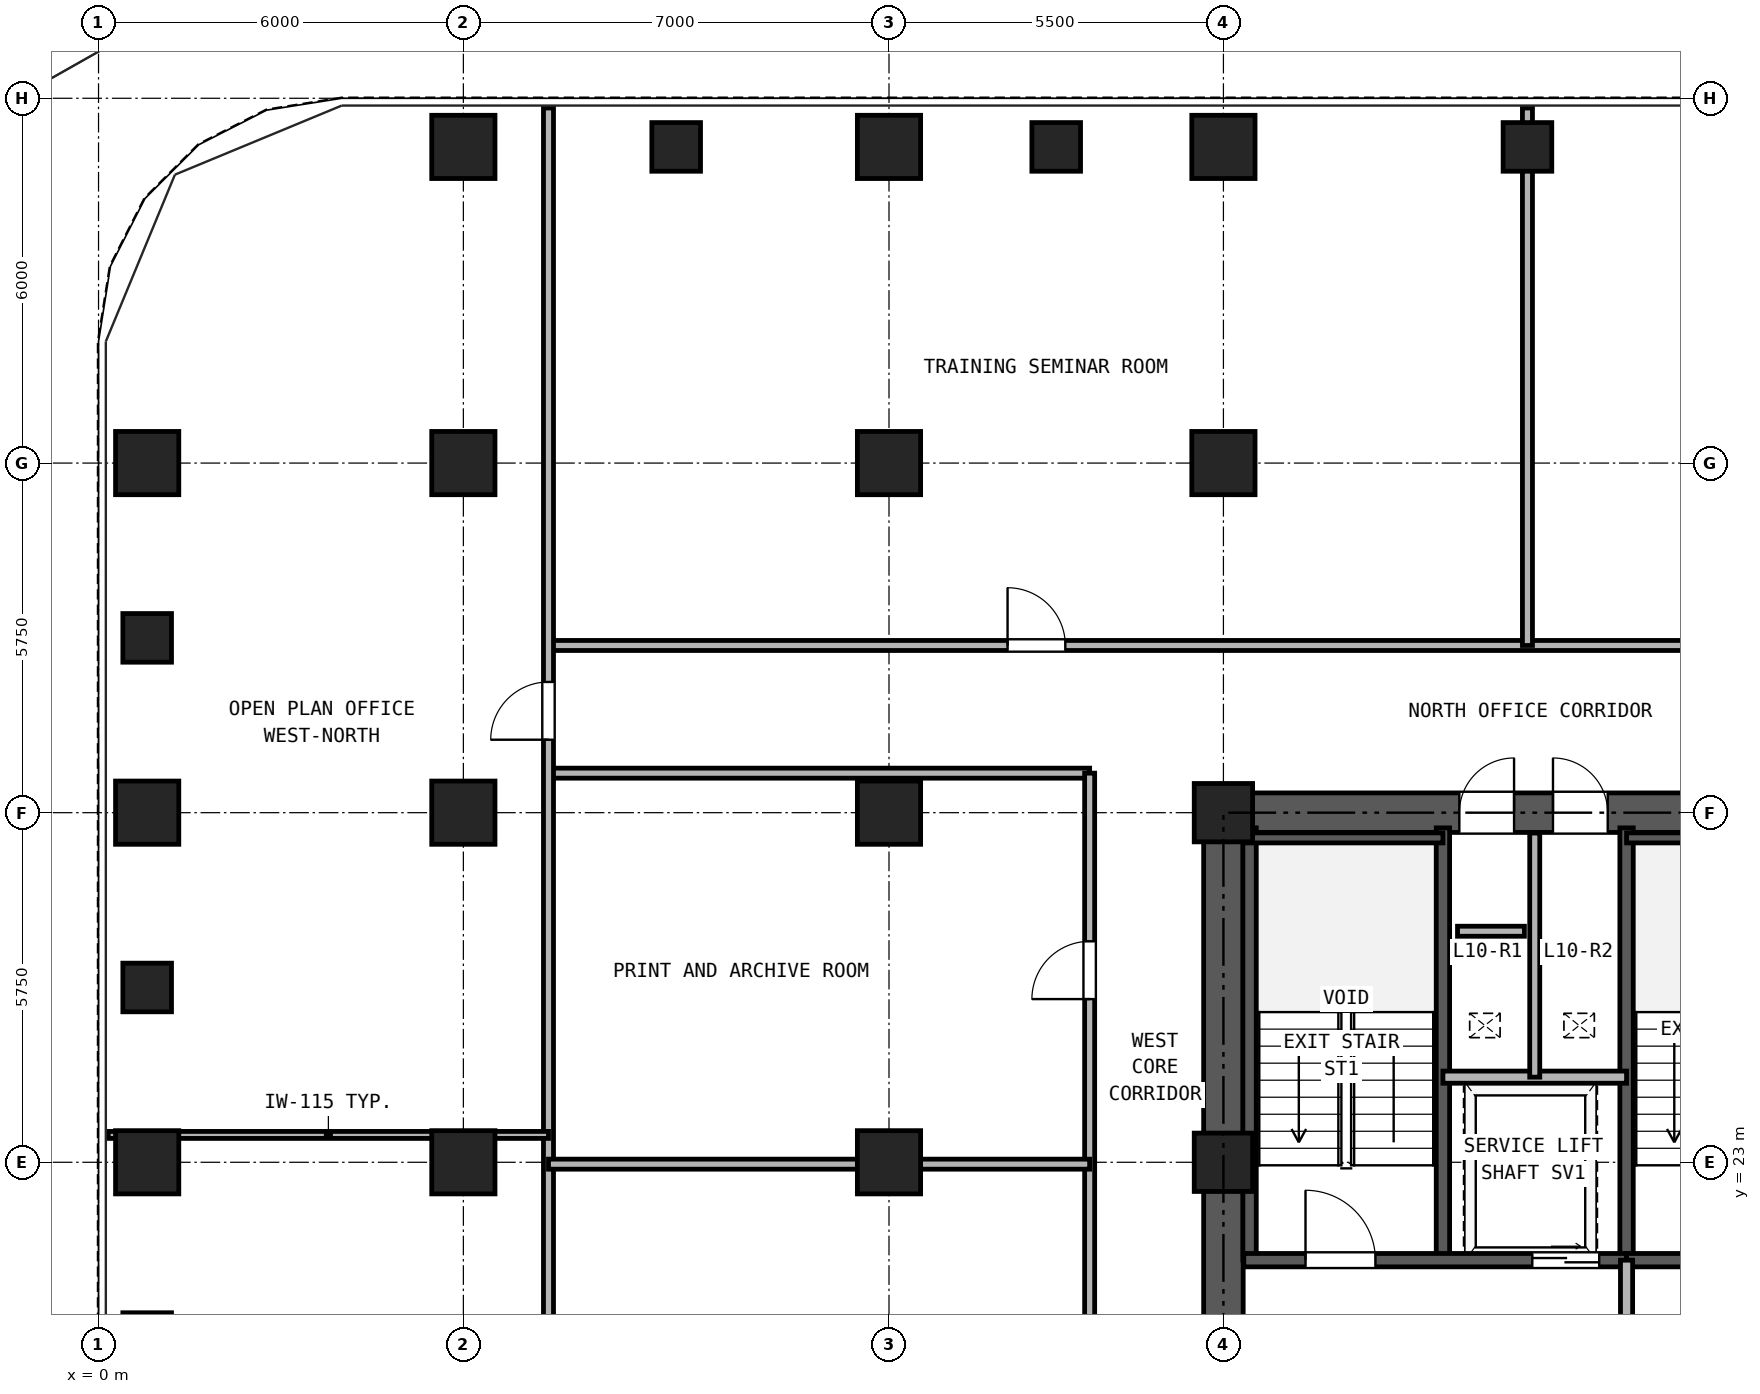
"""IFC4 building model, lengths in metres.
Left out: names, types, materials, properties, quantities, classifications, styles, units other than length and angle.
Written with IfcOpenShell. Run it as: python <this file> out.ifc"""

import sys

from ifc_helpers import new_model, si_unit, direction, frame, frame_2d, origin, origin_2d, place, context, subcontext, project, spatial, rectangle, hollow_rectangle, extrude, source, transform, mapped, element, fill, save


model = new_model("IFC4")
c1 = context("Model", 3, precision=1e-05, world=origin(), true_north=direction((0.0, 1.0)))
c2 = subcontext(c1, "Body", "Model", "MODEL_VIEW")
j1 = project(units=[si_unit("LENGTHUNIT", "METRE"), si_unit("PLANEANGLEUNIT", "RADIAN")], contexts=[c1])
p1 = place(None, origin())
s1 = spatial("IfcSite", under=j1, at=p1, CompositionType="ELEMENT")
p2 = place(p1, origin())
s2 = spatial("IfcBuilding", under=s1, at=p2, CompositionType="ELEMENT")
p3 = place(p2, frame((0.0, 0.0, 40.5)))
s3 = spatial("IfcBuildingStorey", under=s2, at=p3, CompositionType="ELEMENT", Elevation=40.5)
m1 = source(origin(), c2, "Body", "SweptSolid", [
    extrude(hollow_rectangle(XDim=1.04, YDim=1.04, WallThickness=0.065, at=origin_2d()), origin(), (0.0, 0.0, 1.0), 3.32),
])
for number, where, z_axis, x_axis in (
    (1, (6.0, 39.7, 0.0), (0.0, 0.0, 1.0), (1.0, 0.0, 0.0)),
    (2, (13.0, 39.7, 0.0), (0.0, 0.0, 1.0), (1.0, 0.0, 0.0)),
    (3, (18.5, 39.7, 0.0), (0.0, 0.0, 1.0), (1.0, 0.0, 0.0)),
    (4, (0.8, 23.0, 0.0), (0.0, 0.0, 1.0), (1.0, 0.0, 0.0)),
    (5, (0.8, 28.75, 0.0), (0.0, 0.0, 1.0), (1.0, 0.0, 0.0)),
    (6, (0.8, 34.5, 0.0), (0.0, 0.0, 1.0), (1.0, 0.0, 0.0)),
    (7, (6.0, 23.0, 0.0), (0.0, 0.0, 1.0), (1.0, 0.0, 0.0)),
    (8, (6.0, 28.75, 0.0), (0.0, 0.0, 1.0), (1.0, 0.0, 0.0)),
    (9, (6.0, 34.5, 0.0), (0.0, 0.0, 1.0), (1.0, 0.0, 0.0)),
    (10, (13.0, 23.0, 0.0), (0.0, 0.0, 1.0), (1.0, 0.0, 0.0)),
    (11, (13.0, 28.75, 0.0), (0.0, 0.0, 1.0), (1.0, 0.0, 0.0)),
    (12, (13.0, 34.5, 0.0), (0.0, 0.0, 1.0), (1.0, 0.0, 0.0)),
):
    element("IfcColumn", number, at=place(p3, frame(where, z_axis=z_axis, x_axis=x_axis)), inside=s3, PredefinedType="COLUMN", context=c2, shape_type="MappedRepresentation", body=[
        mapped(m1, transform((0.0, 0.0, 0.0), x_axis=(1.0, 0.0, 0.0), y_axis=(0.0, 1.0, 0.0), z_axis=(0.0, 0.0, 1.0), scale=1.0)),
    ])
m2 = source(origin(), c2, "Body", "SweptSolid", [
    extrude(hollow_rectangle(XDim=0.96, YDim=0.96, WallThickness=0.06, at=origin_2d()), origin(), (0.0, 0.0, 1.0), 3.32),
])
for number, where, z_axis, x_axis in (
    (13, (18.5, 23.0, 0.0), (0.0, 0.0, 1.0), (1.0, 0.0, 0.0)),
    (14, (18.5, 28.75, 0.0), (0.0, 0.0, 1.0), (1.0, 0.0, 0.0)),
):
    element("IfcColumn", number, at=place(p3, frame(where, z_axis=z_axis, x_axis=x_axis)), inside=s3, PredefinedType="COLUMN", context=c2, shape_type="MappedRepresentation", body=[
        mapped(m2, transform((0.0, 0.0, 0.0), x_axis=(1.0, 0.0, 0.0), y_axis=(0.0, 1.0, 0.0), z_axis=(0.0, 0.0, 1.0), scale=1.0)),
    ])
p4 = place(p3, frame((18.5, 34.5, 0.0), z_axis=(0.0, 0.0, 1.0), x_axis=(1.0, 0.0, 0.0)))
e15 = element("IfcColumn", 15, at=p4, inside=s3, PredefinedType="COLUMN", context=c2, shape_type="MappedRepresentation", body=[
    mapped(m1, transform((0.0, 0.0, 0.0), x_axis=(1.0, 0.0, 0.0), y_axis=(0.0, 1.0, 0.0), z_axis=(0.0, 0.0, 1.0), scale=1.0)),
])
m3 = source(origin(), c2, "Body", "SweptSolid", [
    extrude(hollow_rectangle(XDim=0.8, YDim=0.8, WallThickness=0.045, at=origin_2d()), origin(), (0.0, 0.0, 1.0), 3.32),
])
for number, where, z_axis, x_axis in (
    (16, (9.5, 39.7, 0.0), (0.0, 0.0, 1.0), (1.0, 0.0, 0.0)),
    (17, (15.75, 39.7, 0.0), (0.0, 0.0, 1.0), (1.0, 0.0, 0.0)),
    (18, (23.5, 39.7, 0.0), (0.0, 0.0, 1.0), (1.0, 0.0, 0.0)),
    (19, (0.8, 20.125, 0.0), (0.0, 0.0, 1.0), (1.0, 0.0, 0.0)),
    (20, (0.8, 25.875, 0.0), (0.0, 0.0, 1.0), (1.0, 0.0, 0.0)),
    (21, (0.8, 31.625, 0.0), (0.0, 0.0, 1.0), (1.0, 0.0, 0.0)),
):
    element("IfcColumn", number, at=place(p3, frame(where, z_axis=z_axis, x_axis=x_axis)), inside=s3, PredefinedType="COLUMN", context=c2, shape_type="MappedRepresentation", body=[
        mapped(m3, transform((0.0, 0.0, 0.0), x_axis=(1.0, 0.0, 0.0), y_axis=(0.0, 1.0, 0.0), z_axis=(0.0, 0.0, 1.0), scale=1.0)),
    ])
p5 = place(p3, frame((18.175, 28.75, 0.0), z_axis=(0.0, 0.0, 1.0), x_axis=(1.0, 0.0, 0.0)))
e22 = element("IfcWall", 22, at=p5, inside=s3, PredefinedType="SHEAR", context=c2, shape_type="SweptSolid", body=[
    extrude(rectangle(XDim=10.65, YDim=0.65, at=frame_2d((5.325, 0.0))), origin(), (0.0, 0.0, 1.0), 3.32),
])
p6 = place(p5, frame((4.205, 0.0, 0.0)))
e23 = element("IfcOpeningElement", 23, at=p6, cuts=e22, PredefinedType="OPENING", context=c2, shape_type="SweptSolid", body=[
    extrude(rectangle(XDim=0.9, YDim=2.05, at=frame_2d((0.45, 1.025))), frame((0.0, 0.335, 0.0), z_axis=(0.0, -1.0, 0.0), x_axis=(1.0, 0.0, 0.0)), (0.0, 0.0, 1.0), 0.67),
])
p7 = place(p5, frame((5.745, 0.0, 0.0)))
e24 = element("IfcOpeningElement", 24, at=p7, cuts=e22, PredefinedType="OPENING", context=c2, shape_type="SweptSolid", body=[
    extrude(rectangle(XDim=0.9, YDim=2.05, at=frame_2d((0.45, 1.025))), frame((0.0, 0.335, 0.0), z_axis=(0.0, -1.0, 0.0), x_axis=(1.0, 0.0, 0.0)), (0.0, 0.0, 1.0), 0.67),
])
p8 = place(p3, frame((18.5, 11.825, 0.0), z_axis=(0.0, 0.0, 1.0), x_axis=(0.0, 1.0, 0.0)))
e25 = element("IfcWall", 25, at=p8, inside=s3, PredefinedType="SHEAR", context=c2, shape_type="SweptSolid", body=[
    extrude(rectangle(XDim=16.6, YDim=0.65, at=frame_2d((8.3, 0.0))), origin(), (0.0, 0.0, 1.0), 3.32),
])
p9 = place(p8, frame((7.325, 0.0, 0.0)))
e26 = element("IfcOpeningElement", 26, at=p9, cuts=e25, PredefinedType="OPENING", context=c2, shape_type="SweptSolid", body=[
    extrude(rectangle(XDim=1.15, YDim=2.2, at=frame_2d((0.575, 1.1))), frame((0.0, 0.335, 0.0), z_axis=(0.0, -1.0, 0.0), x_axis=(1.0, 0.0, 0.0)), (0.0, 0.0, 1.0), 0.67),
])
for number, where, z_axis, x_axis in (
    (27, (18.93, 21.39, 0.0), (0.0, 0.0, 1.0), (0.0, 1.0, 0.0)),
    (28, (22.11, 21.39, 0.0), (0.0, 0.0, 1.0), (0.0, 1.0, 0.0)),
    (29, (25.13, 21.39, 0.0), (0.0, 0.0, 1.0), (0.0, 1.0, 0.0)),
):
    element("IfcWall", number, at=place(p3, frame(where, z_axis=z_axis, x_axis=x_axis)), inside=s3, PredefinedType="SOLIDWALL", context=c2, shape_type="SweptSolid", body=[
        extrude(rectangle(XDim=7.11, YDim=0.22, at=frame_2d((3.555, 0.0))), origin(), (0.0, 0.0, 1.0), 3.32),
    ])
p10 = place(p3, frame((18.835, 28.335, 0.0), z_axis=(0.0, 0.0, 1.0), x_axis=(1.0, 0.0, 0.0)))
e30 = element("IfcWall", 30, at=p10, inside=s3, PredefinedType="PARTITIONING", context=c2, shape_type="SweptSolid", body=[
    extrude(rectangle(XDim=3.275, YDim=0.165, at=frame_2d((1.638, 0.0))), origin(), (0.0, 0.0, 1.0), 3.32),
])
p11 = place(p3, frame((25.13, 28.335, 0.0), z_axis=(0.0, 0.0, 1.0), x_axis=(1.0, 0.0, 0.0)))
e31 = element("IfcWall", 31, at=p11, inside=s3, PredefinedType="PARTITIONING", context=c2, shape_type="SweptSolid", body=[
    extrude(rectangle(XDim=3.035, YDim=0.165, at=frame_2d((1.518, 0.0))), origin(), (0.0, 0.0, 1.0), 3.32),
])
p12 = place(p3, frame((18.835, 21.39, 0.0), z_axis=(0.0, 0.0, 1.0), x_axis=(1.0, 0.0, 0.0)))
e32 = element("IfcWall", 32, at=p12, inside=s3, PredefinedType="SOLIDWALL", context=c2, shape_type="SweptSolid", body=[
    extrude(rectangle(XDim=6.295, YDim=0.22, at=frame_2d((3.147, 0.0))), origin(), (0.0, 0.0, 1.0), 3.32),
])
p13 = place(p12, frame((1.015, 0.0, 0.0)))
e33 = element("IfcOpeningElement", 33, at=p13, cuts=e32, PredefinedType="OPENING", context=c2, shape_type="SweptSolid", body=[
    extrude(rectangle(XDim=1.15, YDim=2.2, at=frame_2d((0.575, 1.1))), frame((0.0, 0.12, 0.0), z_axis=(0.0, -1.0, 0.0), x_axis=(1.0, 0.0, 0.0)), (0.0, 0.0, 1.0), 0.24),
])
p14 = place(p12, frame((4.745, 0.0, 0.0)))
e34 = element("IfcOpeningElement", 34, at=p14, cuts=e32, PredefinedType="OPENING", context=c2, shape_type="SweptSolid", body=[
    extrude(rectangle(XDim=1.1, YDim=2.25, at=frame_2d((0.55, 1.125))), frame((0.0, 0.12, 0.0), z_axis=(0.0, -1.0, 0.0), x_axis=(1.0, 0.0, 0.0)), (0.0, 0.0, 1.0), 0.24),
])
p15 = place(p3, frame((25.13, 21.39, 0.0), z_axis=(0.0, 0.0, 1.0), x_axis=(1.0, 0.0, 0.0)))
e35 = element("IfcWall", 35, at=p15, inside=s3, PredefinedType="SOLIDWALL", context=c2, shape_type="SweptSolid", body=[
    extrude(rectangle(XDim=3.035, YDim=0.22, at=frame_2d((1.518, 0.0))), origin(), (0.0, 0.0, 1.0), 3.32),
])
p16 = place(p15, frame((0.92, 0.0, 0.0)))
e36 = element("IfcOpeningElement", 36, at=p16, cuts=e35, PredefinedType="OPENING", context=c2, shape_type="SweptSolid", body=[
    extrude(rectangle(XDim=1.15, YDim=2.2, at=frame_2d((0.575, 1.1))), frame((0.0, 0.12, 0.0), z_axis=(0.0, -1.0, 0.0), x_axis=(1.0, 0.0, 0.0)), (0.0, 0.0, 1.0), 0.24),
])
p17 = place(p3, frame((22.11, 24.4, 0.0), z_axis=(0.0, 0.0, 1.0), x_axis=(1.0, 0.0, 0.0)))
e37 = element("IfcWall", 37, at=p17, inside=s3, PredefinedType="PARTITIONING", context=c2, shape_type="SweptSolid", body=[
    extrude(rectangle(XDim=3.02, YDim=0.2, at=frame_2d((1.51, 0.0))), origin(), (0.0, 0.0, 1.0), 3.32),
])
p18 = place(p3, frame((23.62, 24.4, 0.0), z_axis=(0.0, 0.0, 1.0), x_axis=(0.0, 1.0, 0.0)))
e38 = element("IfcWall", 38, at=p18, inside=s3, PredefinedType="PARTITIONING", context=c2, shape_type="SweptSolid", body=[
    extrude(rectangle(XDim=4.015, YDim=0.165, at=frame_2d((2.008, 0.0))), origin(), (0.0, 0.0, 1.0), 3.32),
])
p19 = place(p3, frame((25.13, 18.0, 0.0), z_axis=(0.0, 0.0, 1.0), x_axis=(0.0, 1.0, 0.0)))
e39 = element("IfcWall", 39, at=p19, inside=s3, PredefinedType="PARTITIONING", context=c2, shape_type="SweptSolid", body=[
    extrude(rectangle(XDim=3.39, YDim=0.2, at=frame_2d((1.695, 0.0))), origin(), (0.0, 0.0, 1.0), 3.32),
])
p20 = place(p19, frame((1.1, 0.0, 0.0)))
e40 = element("IfcOpeningElement", 40, at=p20, cuts=e39, PredefinedType="OPENING", context=c2, shape_type="SweptSolid", body=[
    extrude(rectangle(XDim=1.15, YDim=2.2, at=frame_2d((0.575, 1.1))), frame((0.0, 0.11, 0.0), z_axis=(0.0, -1.0, 0.0), x_axis=(1.0, 0.0, 0.0)), (0.0, 0.0, 1.0), 0.22),
])
p21 = place(p3, frame((7.4, 31.5, 0.0), z_axis=(0.0, 0.0, 1.0), x_axis=(1.0, 0.0, 0.0)))
e41 = element("IfcWall", 41, at=p21, inside=s3, PredefinedType="PARTITIONING", context=c2, shape_type="SweptSolid", body=[
    extrude(rectangle(XDim=32.2, YDim=0.165, at=frame_2d((16.1, 0.0))), origin(), (0.0, 0.0, 1.0), 2.898),
])
p22 = place(p21, frame((7.55, 0.0, 0.0)))
e42 = element("IfcOpeningElement", 42, at=p22, cuts=e41, PredefinedType="OPENING", context=c2, shape_type="SweptSolid", body=[
    extrude(rectangle(XDim=0.95, YDim=2.15, at=frame_2d((0.475, 1.075))), frame((0.0, 0.093, 0.0), z_axis=(0.0, -1.0, 0.0), x_axis=(1.0, 0.0, 0.0)), (0.0, 0.0, 1.0), 0.185),
])
p23 = place(p21, frame((20.1, 0.0, 0.0)))
e43 = element("IfcOpeningElement", 43, at=p23, cuts=e41, PredefinedType="OPENING", context=c2, shape_type="SweptSolid", body=[
    extrude(rectangle(XDim=0.95, YDim=2.15, at=frame_2d((0.475, 1.075))), frame((0.0, 0.093, 0.0), z_axis=(0.0, -1.0, 0.0), x_axis=(1.0, 0.0, 0.0)), (0.0, 0.0, 1.0), 0.185),
])
p24 = place(p21, frame((28.15, 0.0, 0.0)))
e44 = element("IfcOpeningElement", 44, at=p24, cuts=e41, PredefinedType="OPENING", context=c2, shape_type="SweptSolid", body=[
    extrude(rectangle(XDim=0.95, YDim=2.15, at=frame_2d((0.475, 1.075))), frame((0.0, 0.093, 0.0), z_axis=(0.0, -1.0, 0.0), x_axis=(1.0, 0.0, 0.0)), (0.0, 0.0, 1.0), 0.185),
])
p25 = place(p3, frame((7.4, 29.4, 0.0), z_axis=(0.0, 0.0, 1.0), x_axis=(1.0, 0.0, 0.0)))
e45 = element("IfcWall", 45, at=p25, inside=s3, PredefinedType="PARTITIONING", context=c2, shape_type="SweptSolid", body=[
    extrude(rectangle(XDim=8.9, YDim=0.165, at=frame_2d((4.45, 0.0))), origin(), (0.0, 0.0, 1.0), 3.32),
])
p26 = place(p3, frame((16.3, 11.15, 0.0), z_axis=(0.0, 0.0, 1.0), x_axis=(0.0, 1.0, 0.0)))
e46 = element("IfcWall", 46, at=p26, inside=s3, PredefinedType="PARTITIONING", context=c2, shape_type="SweptSolid", body=[
    extrude(rectangle(XDim=18.25, YDim=0.165, at=frame_2d((9.125, 0.0))), origin(), (0.0, 0.0, 1.0), 3.32),
])
p27 = place(p26, frame((5.409, 0.0, 0.0)))
e47 = element("IfcOpeningElement", 47, at=p27, cuts=e46, PredefinedType="OPENING", context=c2, shape_type="SweptSolid", body=[
    extrude(rectangle(XDim=0.95, YDim=2.15, at=frame_2d((0.475, 1.075))), frame((0.0, 0.093, 0.0), z_axis=(0.0, -1.0, 0.0), x_axis=(1.0, 0.0, 0.0)), (0.0, 0.0, 1.0), 0.185),
])
p28 = place(p26, frame((14.534, 0.0, 0.0)))
e48 = element("IfcOpeningElement", 48, at=p28, cuts=e46, PredefinedType="OPENING", context=c2, shape_type="SweptSolid", body=[
    extrude(rectangle(XDim=0.95, YDim=2.15, at=frame_2d((0.475, 1.075))), frame((0.0, 0.093, 0.0), z_axis=(0.0, -1.0, 0.0), x_axis=(1.0, 0.0, 0.0)), (0.0, 0.0, 1.0), 0.185),
])
p29 = place(p3, frame((7.4, 0.16, 0.0), z_axis=(0.0, 0.0, 1.0), x_axis=(0.0, 1.0, 0.0)))
e49 = element("IfcWall", 49, at=p29, inside=s3, PredefinedType="PARTITIONING", context=c2, shape_type="SweptSolid", body=[
    extrude(rectangle(XDim=40.18, YDim=0.165, at=frame_2d((20.09, 0.0))), origin(), (0.0, 0.0, 1.0), 3.32),
])
p30 = place(p29, frame((9.44, 0.0, 0.0)))
e50 = element("IfcOpeningElement", 50, at=p30, cuts=e49, PredefinedType="OPENING", context=c2, shape_type="SweptSolid", body=[
    extrude(rectangle(XDim=0.95, YDim=2.15, at=frame_2d((0.475, 1.075))), frame((0.0, 0.093, 0.0), z_axis=(0.0, -1.0, 0.0), x_axis=(1.0, 0.0, 0.0)), (0.0, 0.0, 1.0), 0.185),
])
p31 = place(p29, frame((29.79, 0.0, 0.0)))
e51 = element("IfcOpeningElement", 51, at=p31, cuts=e49, PredefinedType="OPENING", context=c2, shape_type="SweptSolid", body=[
    extrude(rectangle(XDim=0.95, YDim=2.15, at=frame_2d((0.475, 1.075))), frame((0.0, 0.093, 0.0), z_axis=(0.0, -1.0, 0.0), x_axis=(1.0, 0.0, 0.0)), (0.0, 0.0, 1.0), 0.185),
])
p32 = place(p3, frame((23.5, 31.5, 0.0), z_axis=(0.0, 0.0, 1.0), x_axis=(0.0, 1.0, 0.0)))
e52 = element("IfcWall", 52, at=p32, inside=s3, PredefinedType="PARTITIONING", context=c2, shape_type="SweptSolid", body=[
    extrude(rectangle(XDim=8.84, YDim=0.165, at=frame_2d((4.42, 0.0))), origin(), (0.0, 0.0, 1.0), 3.32),
])
p33 = place(p3, frame((0.16, 23.45, 0.0), z_axis=(0.0, 0.0, 1.0), x_axis=(1.0, 0.0, 0.0)))
e53 = element("IfcWall", 53, at=p33, inside=s3, PredefinedType="PARTITIONING", context=c2, shape_type="SweptSolid", body=[
    extrude(rectangle(XDim=7.24, YDim=0.115, at=frame_2d((3.62, 0.0))), origin(), (0.0, 0.0, 1.0), 3.32),
])
p34 = place(p3, frame((7.4, 22.969, 0.0), z_axis=(0.0, 0.0, 1.0), x_axis=(1.0, 0.0, 0.0)))
e54 = element("IfcWall", 54, at=p34, inside=s3, PredefinedType="PARTITIONING", context=c2, shape_type="SweptSolid", body=[
    extrude(rectangle(XDim=8.9, YDim=0.165, at=frame_2d((4.45, 0.0))), origin(), (0.0, 0.0, 1.0), 2.539),
])
p35 = place(p3, frame((22.35, 26.8, 0.0), z_axis=(0.0, 0.0, 1.0), x_axis=(1.0, 0.0, 0.0)))
e55 = element("IfcWall", 55, at=p35, inside=s3, PredefinedType="PARTITIONING", context=c2, shape_type="SweptSolid", body=[
    extrude(rectangle(XDim=1.1, YDim=0.165, at=frame_2d((0.55, 0.0))), origin(), (0.0, 0.0, 1.0), 3.32),
])
p36 = place(p13, frame((1.15, 0.0, 0.0), z_axis=(0.0, 0.0, 1.0), x_axis=(-1.0, 0.0, 0.0)))
e56 = element("IfcDoor", 56, at=p36, inside=s3, OperationType="SINGLE_SWING_LEFT", PredefinedType="DOOR", context=c2, shape_type="SweptSolid", body=[
    extrude(rectangle(XDim=1.15, YDim=2.2, at=frame_2d((0.575, 1.1))), frame((0.0, 0.025, 0.0), z_axis=(0.0, -1.0, 0.0), x_axis=(1.0, 0.0, 0.0)), (0.0, 0.0, 1.0), 0.05),
])
fill(e33, e56)
p37 = place(p14, frame((1.1, 0.0, 0.0), z_axis=(0.0, 0.0, 1.0), x_axis=(-1.0, 0.0, 0.0)))
e57 = element("IfcDoor", 57, at=p37, inside=s3, OperationType="DOUBLE_DOOR_SLIDING", PredefinedType="DOOR", context=c2, shape_type="SweptSolid", body=[
    extrude(rectangle(XDim=1.1, YDim=2.25, at=frame_2d((0.55, 1.125))), frame((0.0, 0.025, 0.0), z_axis=(0.0, -1.0, 0.0), x_axis=(1.0, 0.0, 0.0)), (0.0, 0.0, 1.0), 0.05),
])
fill(e34, e57)
p38 = place(p6, origin())
e58 = element("IfcDoor", 58, at=p38, inside=s3, OperationType="SINGLE_SWING_RIGHT", PredefinedType="DOOR", context=c2, shape_type="SweptSolid", body=[
    extrude(rectangle(XDim=0.9, YDim=2.05, at=frame_2d((0.45, 1.025))), frame((0.0, 0.025, 0.0), z_axis=(0.0, -1.0, 0.0), x_axis=(1.0, 0.0, 0.0)), (0.0, 0.0, 1.0), 0.05),
])
fill(e23, e58)
p39 = place(p7, origin())
e59 = element("IfcDoor", 59, at=p39, inside=s3, OperationType="SINGLE_SWING_LEFT", PredefinedType="DOOR", context=c2, shape_type="SweptSolid", body=[
    extrude(rectangle(XDim=0.9, YDim=2.05, at=frame_2d((0.45, 1.025))), frame((0.0, 0.025, 0.0), z_axis=(0.0, -1.0, 0.0), x_axis=(1.0, 0.0, 0.0)), (0.0, 0.0, 1.0), 0.05),
])
fill(e24, e59)
p40 = place(p22, origin())
e60 = element("IfcDoor", 60, at=p40, inside=s3, OperationType="SINGLE_SWING_LEFT", PredefinedType="DOOR", context=c2, shape_type="SweptSolid", body=[
    extrude(rectangle(XDim=0.95, YDim=2.15, at=frame_2d((0.475, 1.075))), frame((0.0, 0.025, 0.0), z_axis=(0.0, -1.0, 0.0), x_axis=(1.0, 0.0, 0.0)), (0.0, 0.0, 1.0), 0.05),
])
fill(e42, e60)
p41 = place(p31, frame((0.95, 0.0, 0.0), z_axis=(0.0, 0.0, 1.0), x_axis=(-1.0, 0.0, 0.0)))
e61 = element("IfcDoor", 61, at=p41, inside=s3, OperationType="SINGLE_SWING_LEFT", PredefinedType="DOOR", context=c2, shape_type="SweptSolid", body=[
    extrude(rectangle(XDim=0.95, YDim=2.15, at=frame_2d((0.475, 1.075))), frame((0.0, 0.025, 0.0), z_axis=(0.0, -1.0, 0.0), x_axis=(1.0, 0.0, 0.0)), (0.0, 0.0, 1.0), 0.05),
])
fill(e51, e61)
p42 = place(p28, frame((0.95, 0.0, 0.0), z_axis=(0.0, 0.0, 1.0), x_axis=(-1.0, 0.0, 0.0)))
e62 = element("IfcDoor", 62, at=p42, inside=s3, OperationType="SINGLE_SWING_LEFT", PredefinedType="DOOR", context=c2, shape_type="SweptSolid", body=[
    extrude(rectangle(XDim=0.95, YDim=2.15, at=frame_2d((0.475, 1.075))), frame((0.0, 0.025, 0.0), z_axis=(0.0, -1.0, 0.0), x_axis=(1.0, 0.0, 0.0)), (0.0, 0.0, 1.0), 0.05),
])
fill(e48, e62)
save(model, sys.argv[1])
